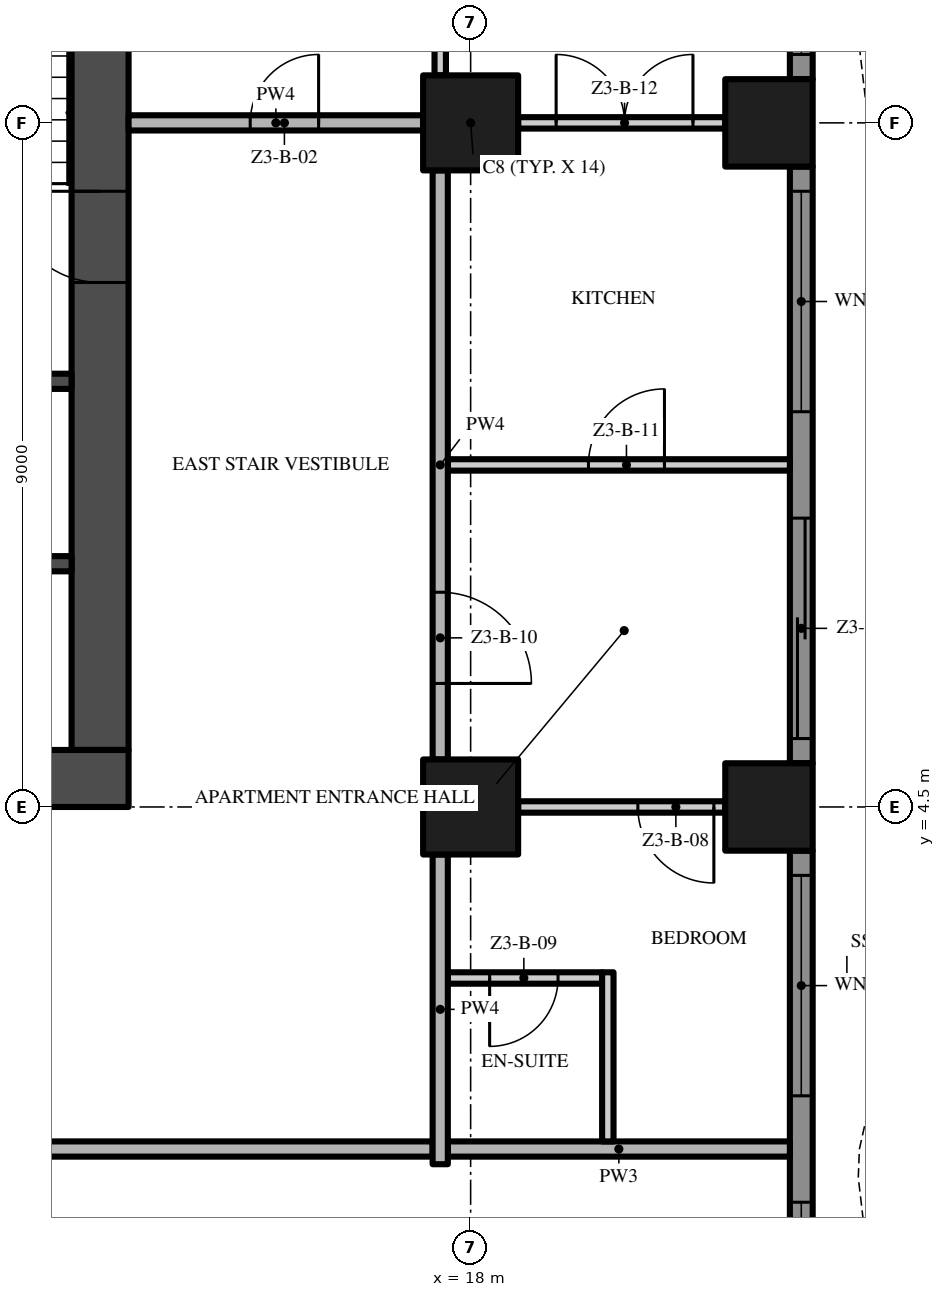
"""IFC4 building model, lengths in metres.
Left out: names, types, materials, properties, quantities, classifications, styles, units other than length and angle.
Written with IfcOpenShell. Run it as: python <this file> out.ifc"""

import sys

from ifc_helpers import new_model, si_unit, direction, frame, frame_2d, origin, origin_2d, place, context, subcontext, project, spatial, polyline, rectangle, outline, extrude, element, fill, save


model = new_model("IFC4")
c1 = context("Model", 3, precision=1e-05, world=origin(), true_north=direction((0.0, 1.0)))
c2 = subcontext(c1, "Body", "Model", "MODEL_VIEW")
j1 = project(units=[si_unit("LENGTHUNIT", "METRE"), si_unit("PLANEANGLEUNIT", "RADIAN")], contexts=[c1])
p1 = place(None, origin())
s1 = spatial("IfcSite", under=j1, at=p1, CompositionType="ELEMENT")
p2 = place(p1, origin())
s2 = spatial("IfcBuilding", under=s1, at=p2, CompositionType="ELEMENT")
p3 = place(p2, frame((0.0, 0.0, 140.2)))
s3 = spatial("IfcBuildingStorey", under=s2, at=p3, CompositionType="ELEMENT", Elevation=140.2)
p4 = place(p3, frame((-13.5, 4.875, -0.3), z_axis=(0.0, 0.0, 1.0), x_axis=(1.0, 0.0, 0.0)))
e1 = element("IfcWall", 1, at=p4, inside=s3, PredefinedType="SHEAR", context=c2, shape_type="SweptSolid", body=[
    extrude(rectangle(XDim=27.0, YDim=0.75, at=frame_2d((13.5, 0.0))), origin(), (0.0, 0.0, 1.0), 3.8),
])
p5 = place(p4, frame((12.0, 0.0, 0.3)))
e2 = element("IfcOpeningElement", 2, at=p5, cuts=e1, PredefinedType="OPENING", context=c2, shape_type="SweptSolid", body=[
    extrude(rectangle(XDim=3.0, YDim=2.4, at=frame_2d((1.5, 1.2))), frame((0.0, 0.385, 0.0), z_axis=(0.0, -1.0, 0.0), x_axis=(1.0, 0.0, 0.0)), (0.0, 0.0, 1.0), 0.77),
])
p6 = place(p4, frame((4.9, 0.0, 0.3)))
e3 = element("IfcOpeningElement", 3, at=p6, cuts=e1, PredefinedType="OPENING", context=c2, shape_type="SweptSolid", body=[
    extrude(rectangle(XDim=1.2, YDim=2.2, at=frame_2d((0.6, 1.1))), frame((0.0, 0.385, 0.0), z_axis=(0.0, -1.0, 0.0), x_axis=(1.0, 0.0, 0.0)), (0.0, 0.0, 1.0), 0.77),
])
p7 = place(p4, frame((20.75, 0.0, 0.3)))
e4 = element("IfcOpeningElement", 4, at=p7, cuts=e1, PredefinedType="OPENING", context=c2, shape_type="SweptSolid", body=[
    extrude(rectangle(XDim=1.5, YDim=2.2, at=frame_2d((0.75, 1.1))), frame((0.0, 0.385, 0.0), z_axis=(0.0, -1.0, 0.0), x_axis=(1.0, 0.0, 0.0)), (0.0, 0.0, 1.0), 0.77),
])
p8 = place(p4, frame((17.4, 0.0, 0.3)))
e5 = element("IfcOpeningElement", 5, at=p8, cuts=e1, PredefinedType="OPENING", context=c2, shape_type="SweptSolid", body=[
    extrude(rectangle(XDim=1.2, YDim=2.2, at=frame_2d((0.6, 1.1))), frame((0.0, 0.385, 0.0), z_axis=(0.0, -1.0, 0.0), x_axis=(1.0, 0.0, 0.0)), (0.0, 0.0, 1.0), 0.77),
])
p9 = place(p3, frame((13.125, 5.25, -0.3), z_axis=(0.0, 0.0, 1.0), x_axis=(0.0, 1.0, 0.0)))
e6 = element("IfcWall", 6, at=p9, inside=s3, PredefinedType="SHEAR", context=c2, shape_type="SweptSolid", body=[
    extrude(rectangle(XDim=16.5, YDim=0.75, at=frame_2d((8.25, 0.0))), origin(), (0.0, 0.0, 1.0), 3.8),
])
p10 = place(p9, frame((6.15, 0.0, 0.3)))
e7 = element("IfcOpeningElement", 7, at=p10, cuts=e6, PredefinedType="OPENING", context=c2, shape_type="SweptSolid", body=[
    extrude(rectangle(XDim=1.2, YDim=2.2, at=frame_2d((0.6, 1.1))), frame((0.0, 0.385, 0.0), z_axis=(0.0, -1.0, 0.0), x_axis=(1.0, 0.0, 0.0)), (0.0, 0.0, 1.0), 0.77),
])
for number, where, z_axis, x_axis in (
    (8, (18.0, 13.5, 0.0), (0.0, 0.0, 1.0), (1.0, 0.0, 0.0)),
    (9, (18.0, 4.5, 0.0), (0.0, 0.0, 1.0), (1.0, 0.0, 0.0)),
):
    element("IfcColumn", number, at=place(p3, frame(where, z_axis=z_axis, x_axis=x_axis)), inside=s3, PredefinedType="COLUMN", context=c2, shape_type="SweptSolid", body=[
        extrude(rectangle(XDim=1.25, YDim=1.25, at=origin_2d()), origin(), (0.0, 0.0, 1.0), 3.5),
    ])
for number, where, z_axis, x_axis in (
    (10, (21.925, 13.5, 0.0), (0.0, 0.0, 1.0), (1.0, 0.0, 0.0)),
    (11, (21.925, 4.5, 0.0), (0.0, 0.0, 1.0), (1.0, 0.0, 0.0)),
):
    element("IfcColumn", number, at=place(p3, frame(where, z_axis=z_axis, x_axis=x_axis)), inside=s3, PredefinedType="COLUMN", context=c2, shape_type="SweptSolid", body=[
        extrude(rectangle(XDim=1.15, YDim=1.15, at=origin_2d()), origin(), (0.0, 0.0, 1.0), 3.5),
    ])
p11 = place(p3, frame((22.35, 3.925, 0.0), z_axis=(0.0, 0.0, 1.0), x_axis=(0.0, -1.0, 0.0)))
e12 = element("IfcWall", 12, at=p11, inside=s3, PredefinedType="SOLIDWALL", context=c2, shape_type="SweptSolid", body=[
    extrude(rectangle(XDim=7.85, YDim=0.3, at=frame_2d((3.925, 0.0))), origin(), (0.0, 0.0, 1.0), 3.5),
])
p12 = place(p11, frame((4.625, 0.0, 0.45)))
e13 = element("IfcOpeningElement", 13, at=p12, cuts=e12, PredefinedType="OPENING", context=c2, shape_type="SweptSolid", body=[
    extrude(rectangle(XDim=2.9, YDim=2.65, at=frame_2d((1.45, 1.325))), frame((0.0, 0.16, 0.0), z_axis=(0.0, -1.0, 0.0), x_axis=(1.0, 0.0, 0.0)), (0.0, 0.0, 1.0), 0.32),
])
p13 = place(p11, frame((0.325, 0.0, 0.45)))
e14 = element("IfcOpeningElement", 14, at=p13, cuts=e12, PredefinedType="OPENING", context=c2, shape_type="SweptSolid", body=[
    extrude(rectangle(XDim=2.9, YDim=2.65, at=frame_2d((1.45, 1.325))), frame((0.0, 0.16, 0.0), z_axis=(0.0, -1.0, 0.0), x_axis=(1.0, 0.0, 0.0)), (0.0, 0.0, 1.0), 0.32),
])
p14 = place(p3, frame((22.35, 12.925, 0.0), z_axis=(0.0, 0.0, 1.0), x_axis=(0.0, -1.0, 0.0)))
e15 = element("IfcWall", 15, at=p14, inside=s3, PredefinedType="SOLIDWALL", context=c2, shape_type="SweptSolid", body=[
    extrude(rectangle(XDim=7.85, YDim=0.3, at=frame_2d((3.925, 0.0))), origin(), (0.0, 0.0, 1.0), 3.5),
])
p15 = place(p14, frame((4.625, 0.0, 0.0)))
e16 = element("IfcOpeningElement", 16, at=p15, cuts=e15, PredefinedType="OPENING", context=c2, shape_type="SweptSolid", body=[
    extrude(rectangle(XDim=2.9, YDim=2.4, at=frame_2d((1.45, 1.2))), frame((0.0, 0.16, 0.0), z_axis=(0.0, -1.0, 0.0), x_axis=(1.0, 0.0, 0.0)), (0.0, 0.0, 1.0), 0.32),
])
p16 = place(p14, frame((0.325, 0.0, 0.45)))
e17 = element("IfcOpeningElement", 17, at=p16, cuts=e15, PredefinedType="OPENING", context=c2, shape_type="SweptSolid", body=[
    extrude(rectangle(XDim=2.9, YDim=2.65, at=frame_2d((1.45, 1.325))), frame((0.0, 0.16, 0.0), z_axis=(0.0, -1.0, 0.0), x_axis=(1.0, 0.0, 0.0)), (0.0, 0.0, 1.0), 0.32),
])
p17 = place(p3, frame((22.35, 18.0, 0.0), z_axis=(0.0, 0.0, 1.0), x_axis=(0.0, -1.0, 0.0)))
e18 = element("IfcWall", 18, at=p17, inside=s3, PredefinedType="SOLIDWALL", context=c2, shape_type="SweptSolid", body=[
    extrude(rectangle(XDim=3.925, YDim=0.3, at=frame_2d((1.962, 0.0))), origin(), (0.0, 0.0, 1.0), 3.5),
])
p18 = place(p17, frame((0.7, 0.0, 0.45)))
e19 = element("IfcOpeningElement", 19, at=p18, cuts=e18, PredefinedType="OPENING", context=c2, shape_type="SweptSolid", body=[
    extrude(rectangle(XDim=2.9, YDim=2.65, at=frame_2d((1.45, 1.325))), frame((0.0, 0.16, 0.0), z_axis=(0.0, -1.0, 0.0), x_axis=(1.0, 0.0, 0.0)), (0.0, 0.0, 1.0), 0.32),
])
p19 = place(p3, origin())
e20 = element("IfcWall", 20, at=p19, inside=s3, PredefinedType="USERDEFINED", context=c2, shape_type="SweptSolid", body=[
    extrude(outline(polyline([(23.451, -13.5), (24.112, -12.0), (24.845, -10.5), (25.369, -9.0), (25.5, -7.875), (25.485, -7.5), (25.149, -6.0), (24.488, -4.5), (23.755, -3.0), (23.231, -1.5), (23.1, -0.375), (23.115, 0.0), (23.451, 1.5), (24.112, 3.0), (24.845, 4.5), (25.369, 6.0), (25.5, 7.125), (25.485, 7.5), (25.149, 9.0), (24.488, 10.5), (23.755, 12.0), (23.231, 13.5), (23.1, 14.625), (23.115, 15.0), (23.451, 16.5), (24.112, 18.0), (23.883, 18.101), (23.213, 16.579), (22.866, 15.033), (22.849, 14.615), (22.986, 13.444), (23.524, 11.904), (24.261, 10.395), (24.91, 8.921), (25.236, 7.467), (25.249, 7.135), (25.124, 6.056), (24.614, 4.596), (23.885, 3.105), (23.213, 1.579), (22.866, 0.033), (22.849, -0.385), (22.986, -1.556), (23.524, -3.096), (24.261, -4.605), (24.91, -6.079), (25.236, -7.533), (25.249, -7.865), (25.124, -8.944), (24.614, -10.404), (23.885, -11.895), (23.223, -13.399), (23.451, -13.5)])), origin(), (0.0, 0.0, 1.0), 0.9),
])
for number, where, z_axis, x_axis in (
    (21, (9.65, 7.7, 0.0), (0.0, 0.0, 1.0), (1.0, 0.0, 0.0)),
    (22, (9.65, 10.1, 0.0), (0.0, 0.0, 1.0), (1.0, 0.0, 0.0)),
):
    element("IfcWall", number, at=place(p3, frame(where, z_axis=z_axis, x_axis=x_axis)), inside=s3, PredefinedType="SHEAR", context=c2, shape_type="SweptSolid", body=[
        extrude(rectangle(XDim=3.1, YDim=0.2, at=frame_2d((1.55, 0.0))), origin(), (0.0, 0.0, 1.0), 3.5),
    ])
p20 = place(p3, frame((17.5, 0.0, 0.0), z_axis=(0.0, 0.0, 1.0), x_axis=(-1.0, 0.0, 0.0)))
e23 = element("IfcWall", 23, at=p20, inside=s3, PredefinedType="PARTITIONING", context=c2, shape_type="SweptSolid", body=[
    extrude(rectangle(XDim=35.0, YDim=0.2, at=frame_2d((17.5, 0.0))), origin(), (0.0, 0.0, 1.0), 3.5),
])
p21 = place(p20, frame((28.0, 0.0, 0.0)))
e24 = element("IfcOpeningElement", 24, at=p21, cuts=e23, PredefinedType="OPENING", context=c2, shape_type="SweptSolid", body=[
    extrude(rectangle(XDim=1.5, YDim=2.4, at=frame_2d((0.75, 1.2))), frame((0.0, 0.11, 0.0), z_axis=(0.0, -1.0, 0.0), x_axis=(1.0, 0.0, 0.0)), (0.0, 0.0, 1.0), 0.22),
])
p22 = place(p20, frame((10.0, 0.0, 0.0)))
e25 = element("IfcOpeningElement", 25, at=p22, cuts=e23, PredefinedType="OPENING", context=c2, shape_type="SweptSolid", body=[
    extrude(rectangle(XDim=1.5, YDim=2.4, at=frame_2d((0.75, 1.2))), frame((0.0, 0.11, 0.0), z_axis=(0.0, -1.0, 0.0), x_axis=(1.0, 0.0, 0.0)), (0.0, 0.0, 1.0), 0.22),
])
p23 = place(p3, frame((17.7, 0.0, 0.0), z_axis=(0.0, 0.0, 1.0), x_axis=(1.0, 0.0, 0.0)))
e26 = element("IfcWall", 26, at=p23, inside=s3, PredefinedType="PARTITIONING", context=c2, shape_type="SweptSolid", body=[
    extrude(rectangle(XDim=4.5, YDim=0.2, at=frame_2d((2.25, 0.0))), origin(), (0.0, 0.0, 1.0), 3.5),
])
p24 = place(p3, frame((19.73, 2.25, 0.0), z_axis=(0.0, 0.0, 1.0), x_axis=(-1.0, 0.0, 0.0)))
e27 = element("IfcWall", 27, at=p24, inside=s3, PredefinedType="PARTITIONING", context=c2, shape_type="SweptSolid", body=[
    extrude(rectangle(XDim=2.03, YDim=0.15, at=frame_2d((1.015, 0.0))), origin(), (0.0, 0.0, 1.0), 3.5),
])
p25 = place(p24, frame((0.58, 0.0, 0.0)))
e28 = element("IfcOpeningElement", 28, at=p25, cuts=e27, PredefinedType="OPENING", context=c2, shape_type="SweptSolid", body=[
    extrude(rectangle(XDim=0.9, YDim=2.1, at=frame_2d((0.45, 1.05))), frame((0.0, 0.085, 0.0), z_axis=(0.0, -1.0, 0.0), x_axis=(1.0, 0.0, 0.0)), (0.0, 0.0, 1.0), 0.17),
])
p26 = place(p3, frame((21.35, 4.5, 0.0), z_axis=(0.0, 0.0, 1.0), x_axis=(-1.0, 0.0, 0.0)))
e29 = element("IfcWall", 29, at=p26, inside=s3, PredefinedType="PARTITIONING", context=c2, shape_type="SweptSolid", body=[
    extrude(rectangle(XDim=2.725, YDim=0.15, at=frame_2d((1.363, 0.0))), origin(), (0.0, 0.0, 1.0), 3.5),
])
p27 = place(p26, frame((0.15, 0.0, 0.0)))
e30 = element("IfcOpeningElement", 30, at=p27, cuts=e29, PredefinedType="OPENING", context=c2, shape_type="SweptSolid", body=[
    extrude(rectangle(XDim=1.0, YDim=2.4, at=frame_2d((0.5, 1.2))), frame((0.0, 0.085, 0.0), z_axis=(0.0, -1.0, 0.0), x_axis=(1.0, 0.0, 0.0)), (0.0, 0.0, 1.0), 0.17),
])
p28 = place(p3, frame((17.7, 9.0, 0.0), z_axis=(0.0, 0.0, 1.0), x_axis=(1.0, 0.0, 0.0)))
e31 = element("IfcWall", 31, at=p28, inside=s3, PredefinedType="PARTITIONING", context=c2, shape_type="SweptSolid", body=[
    extrude(rectangle(XDim=4.5, YDim=0.15, at=frame_2d((2.25, 0.0))), origin(), (0.0, 0.0, 1.0), 3.5),
])
p29 = place(p28, frame((1.85, 0.0, 0.0)))
e32 = element("IfcOpeningElement", 32, at=p29, cuts=e31, PredefinedType="OPENING", context=c2, shape_type="SweptSolid", body=[
    extrude(rectangle(XDim=1.0, YDim=2.4, at=frame_2d((0.5, 1.2))), frame((0.0, 0.085, 0.0), z_axis=(0.0, -1.0, 0.0), x_axis=(1.0, 0.0, 0.0)), (0.0, 0.0, 1.0), 0.17),
])
p30 = place(p3, frame((13.5, 13.5, 0.0), z_axis=(0.0, 0.0, 1.0), x_axis=(1.0, 0.0, 0.0)))
e33 = element("IfcWall", 33, at=p30, inside=s3, PredefinedType="PARTITIONING", context=c2, shape_type="SweptSolid", body=[
    extrude(rectangle(XDim=3.875, YDim=0.2, at=frame_2d((1.938, 0.0))), origin(), (0.0, 0.0, 1.0), 3.5),
])
p31 = place(p30, frame((1.6, 0.0, 0.0)))
e34 = element("IfcOpeningElement", 34, at=p31, cuts=e33, PredefinedType="OPENING", context=c2, shape_type="SweptSolid", body=[
    extrude(rectangle(XDim=0.9, YDim=2.1, at=frame_2d((0.45, 1.05))), frame((0.0, 0.11, 0.0), z_axis=(0.0, -1.0, 0.0), x_axis=(1.0, 0.0, 0.0)), (0.0, 0.0, 1.0), 0.22),
])
p32 = place(p3, frame((18.625, 13.5, 0.0), z_axis=(0.0, 0.0, 1.0), x_axis=(1.0, 0.0, 0.0)))
e35 = element("IfcWall", 35, at=p32, inside=s3, PredefinedType="PARTITIONING", context=c2, shape_type="SweptSolid", body=[
    extrude(rectangle(XDim=2.725, YDim=0.15, at=frame_2d((1.363, 0.0))), origin(), (0.0, 0.0, 1.0), 3.5),
])
p33 = place(p32, frame((0.5, 0.0, 0.0)))
e36 = element("IfcOpeningElement", 36, at=p33, cuts=e35, PredefinedType="OPENING", context=c2, shape_type="SweptSolid", body=[
    extrude(rectangle(XDim=1.8, YDim=2.4, at=frame_2d((0.9, 1.2))), frame((0.0, 0.085, 0.0), z_axis=(0.0, -1.0, 0.0), x_axis=(1.0, 0.0, 0.0)), (0.0, 0.0, 1.0), 0.17),
])
p34 = place(p3, frame((17.6, -0.2, 0.0), z_axis=(0.0, 0.0, 1.0), x_axis=(0.0, 1.0, 0.0)))
e37 = element("IfcWall", 37, at=p34, inside=s3, PredefinedType="PARTITIONING", context=c2, shape_type="SweptSolid", body=[
    extrude(rectangle(XDim=4.075, YDim=0.2, at=frame_2d((2.038, 0.0))), origin(), (0.0, 0.0, 1.0), 3.5),
])
p35 = place(p3, frame((17.6, 12.875, 0.0), z_axis=(0.0, 0.0, 1.0), x_axis=(0.0, -1.0, 0.0)))
e38 = element("IfcWall", 38, at=p35, inside=s3, PredefinedType="PARTITIONING", context=c2, shape_type="SweptSolid", body=[
    extrude(rectangle(XDim=7.75, YDim=0.2, at=frame_2d((3.875, 0.0))), origin(), (0.0, 0.0, 1.0), 3.5),
])
p36 = place(p35, frame((5.55, 0.0, 0.0)))
e39 = element("IfcOpeningElement", 39, at=p36, cuts=e38, PredefinedType="OPENING", context=c2, shape_type="SweptSolid", body=[
    extrude(rectangle(XDim=1.2, YDim=2.4, at=frame_2d((0.6, 1.2))), frame((0.0, 0.11, 0.0), z_axis=(0.0, -1.0, 0.0), x_axis=(1.0, 0.0, 0.0)), (0.0, 0.0, 1.0), 0.22),
])
p37 = place(p3, frame((17.6, 14.125, 0.0), z_axis=(0.0, 0.0, 1.0), x_axis=(0.0, 1.0, 0.0)))
e40 = element("IfcWall", 40, at=p37, inside=s3, PredefinedType="PARTITIONING", context=c2, shape_type="SweptSolid", body=[
    extrude(rectangle(XDim=3.3, YDim=0.15, at=frame_2d((1.65, 0.0))), origin(), (0.0, 0.0, 1.0), 3.5),
])
p38 = place(p3, frame((19.805, 0.1, 0.0), z_axis=(0.0, 0.0, 1.0), x_axis=(0.0, 1.0, 0.0)))
e41 = element("IfcWall", 41, at=p38, inside=s3, PredefinedType="PARTITIONING", context=c2, shape_type="SweptSolid", body=[
    extrude(rectangle(XDim=2.225, YDim=0.15, at=frame_2d((1.113, 0.0))), origin(), (0.0, 0.0, 1.0), 3.5),
])
p39 = place(p12, origin())
e42 = element("IfcWindow", 42, at=p39, inside=s3, PartitioningType="SINGLE_PANEL", PredefinedType="WINDOW", context=c2, shape_type="SweptSolid", body=[
    extrude(rectangle(XDim=2.9, YDim=2.65, at=frame_2d((1.45, 1.325))), frame((0.0, 0.03, 0.0), z_axis=(0.0, -1.0, 0.0), x_axis=(1.0, 0.0, 0.0)), (0.0, 0.0, 1.0), 0.06),
])
fill(e13, e42)
p40 = place(p13, origin())
e43 = element("IfcWindow", 43, at=p40, inside=s3, PartitioningType="SINGLE_PANEL", PredefinedType="WINDOW", context=c2, shape_type="SweptSolid", body=[
    extrude(rectangle(XDim=2.9, YDim=2.65, at=frame_2d((1.45, 1.325))), frame((0.0, 0.03, 0.0), z_axis=(0.0, -1.0, 0.0), x_axis=(1.0, 0.0, 0.0)), (0.0, 0.0, 1.0), 0.06),
])
fill(e14, e43)
p41 = place(p15, origin())
e44 = element("IfcDoor", 44, at=p41, inside=s3, OperationType="SINGLE_SWING_LEFT", PredefinedType="DOOR", context=c2, shape_type="SweptSolid", body=[
    extrude(rectangle(XDim=2.9, YDim=2.4, at=frame_2d((1.45, 1.2))), frame((0.0, 0.025, 0.0), z_axis=(0.0, -1.0, 0.0), x_axis=(1.0, 0.0, 0.0)), (0.0, 0.0, 1.0), 0.05),
])
fill(e16, e44)
p42 = place(p16, origin())
e45 = element("IfcWindow", 45, at=p42, inside=s3, PartitioningType="SINGLE_PANEL", PredefinedType="WINDOW", context=c2, shape_type="SweptSolid", body=[
    extrude(rectangle(XDim=2.9, YDim=2.65, at=frame_2d((1.45, 1.325))), frame((0.0, 0.03, 0.0), z_axis=(0.0, -1.0, 0.0), x_axis=(1.0, 0.0, 0.0)), (0.0, 0.0, 1.0), 0.06),
])
fill(e17, e45)
p43 = place(p18, origin())
e46 = element("IfcWindow", 46, at=p43, inside=s3, PartitioningType="SINGLE_PANEL", PredefinedType="WINDOW", context=c2, shape_type="SweptSolid", body=[
    extrude(rectangle(XDim=2.9, YDim=2.65, at=frame_2d((1.45, 1.325))), frame((0.0, 0.03, 0.0), z_axis=(0.0, -1.0, 0.0), x_axis=(1.0, 0.0, 0.0)), (0.0, 0.0, 1.0), 0.06),
])
fill(e19, e46)
p44 = place(p10, frame((1.2, 0.0, 0.0), z_axis=(0.0, 0.0, 1.0), x_axis=(-1.0, 0.0, 0.0)))
e47 = element("IfcDoor", 47, at=p44, inside=s3, OperationType="SINGLE_SWING_LEFT", PredefinedType="DOOR", context=c2, shape_type="SweptSolid", body=[
    extrude(rectangle(XDim=1.2, YDim=2.2, at=frame_2d((0.6, 1.1))), frame((0.0, 0.025, 0.0), z_axis=(0.0, -1.0, 0.0), x_axis=(1.0, 0.0, 0.0)), (0.0, 0.0, 1.0), 0.05),
])
fill(e7, e47)
p45 = place(p31, origin())
e48 = element("IfcDoor", 48, at=p45, inside=s3, OperationType="SINGLE_SWING_RIGHT", PredefinedType="DOOR", context=c2, shape_type="SweptSolid", body=[
    extrude(rectangle(XDim=0.9, YDim=2.1, at=frame_2d((0.45, 1.05))), frame((0.0, 0.025, 0.0), z_axis=(0.0, -1.0, 0.0), x_axis=(1.0, 0.0, 0.0)), (0.0, 0.0, 1.0), 0.05),
])
fill(e34, e48)
p46 = place(p27, origin())
e49 = element("IfcDoor", 49, at=p46, inside=s3, OperationType="SINGLE_SWING_LEFT", PredefinedType="DOOR", context=c2, shape_type="SweptSolid", body=[
    extrude(rectangle(XDim=1.0, YDim=2.4, at=frame_2d((0.5, 1.2))), frame((0.0, 0.025, 0.0), z_axis=(0.0, -1.0, 0.0), x_axis=(1.0, 0.0, 0.0)), (0.0, 0.0, 1.0), 0.05),
])
fill(e30, e49)
p47 = place(p25, origin())
e50 = element("IfcDoor", 50, at=p47, inside=s3, OperationType="SINGLE_SWING_RIGHT", PredefinedType="DOOR", context=c2, shape_type="SweptSolid", body=[
    extrude(rectangle(XDim=0.9, YDim=2.1, at=frame_2d((0.45, 1.05))), frame((0.0, 0.025, 0.0), z_axis=(0.0, -1.0, 0.0), x_axis=(1.0, 0.0, 0.0)), (0.0, 0.0, 1.0), 0.05),
])
fill(e28, e50)
p48 = place(p36, origin())
e51 = element("IfcDoor", 51, at=p48, inside=s3, OperationType="SINGLE_SWING_RIGHT", PredefinedType="DOOR", context=c2, shape_type="SweptSolid", body=[
    extrude(rectangle(XDim=1.2, YDim=2.4, at=frame_2d((0.6, 1.2))), frame((0.0, 0.025, 0.0), z_axis=(0.0, -1.0, 0.0), x_axis=(1.0, 0.0, 0.0)), (0.0, 0.0, 1.0), 0.05),
])
fill(e39, e51)
p49 = place(p29, origin())
e52 = element("IfcDoor", 52, at=p49, inside=s3, OperationType="SINGLE_SWING_RIGHT", PredefinedType="DOOR", context=c2, shape_type="SweptSolid", body=[
    extrude(rectangle(XDim=1.0, YDim=2.4, at=frame_2d((0.5, 1.2))), frame((0.0, 0.025, 0.0), z_axis=(0.0, -1.0, 0.0), x_axis=(1.0, 0.0, 0.0)), (0.0, 0.0, 1.0), 0.05),
])
fill(e32, e52)
p50 = place(p33, origin())
e53 = element("IfcDoor", 53, at=p50, inside=s3, OperationType="DOUBLE_DOOR_SINGLE_SWING", PredefinedType="DOOR", context=c2, shape_type="SweptSolid", body=[
    extrude(rectangle(XDim=1.8, YDim=2.4, at=frame_2d((0.9, 1.2))), frame((0.0, 0.025, 0.0), z_axis=(0.0, -1.0, 0.0), x_axis=(1.0, 0.0, 0.0)), (0.0, 0.0, 1.0), 0.05),
])
fill(e36, e53)
save(model, sys.argv[1])
